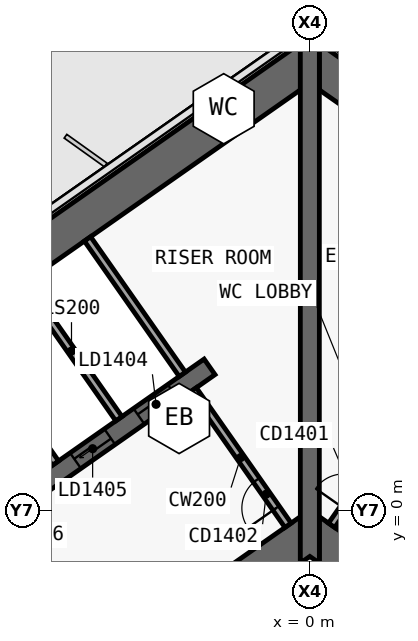
"""IFC4 building model, lengths in metres.
Left out: names, types, materials, properties, quantities, classifications, styles, units other than length and angle.
Written with IfcOpenShell. Run it as: python <this file> out.ifc"""

import sys

from ifc_helpers import new_model, si_unit, direction, frame, frame_2d, origin, place, context, subcontext, project, spatial, polyline, rectangle, outline, extrude, element, fill, save


model = new_model("IFC4")
c1 = context("Model", 3, precision=1e-05, world=origin(), true_north=direction((0.0, 1.0)))
c2 = subcontext(c1, "Body", "Model", "MODEL_VIEW")
j1 = project(units=[si_unit("LENGTHUNIT", "METRE"), si_unit("PLANEANGLEUNIT", "RADIAN")], contexts=[c1])
p1 = place(None, origin())
s1 = spatial("IfcSite", under=j1, at=p1, CompositionType="ELEMENT")
p2 = place(p1, origin())
s2 = spatial("IfcBuilding", under=s1, at=p2, CompositionType="ELEMENT")
p3 = place(p2, frame((0.0, 0.0, 76.1)))
s3 = spatial("IfcBuildingStorey", under=s2, at=p3, CompositionType="ELEMENT", Elevation=76.1)
p4 = place(p3, frame((0.037, 11.867, 0.0), z_axis=(0.0, 0.0, 1.0), x_axis=(-0.819155306259, -0.573571777746, 0.0)))
e1 = element("IfcWall", 1, at=p4, inside=s3, PredefinedType="SHEAR", context=c2, shape_type="SweptSolid", body=[
    extrude(outline(polyline([(33.837, 0.5), (0.7, 0.5), (0.0, -0.5), (33.837, -0.5), (33.837, 0.5)])), origin(), (0.0, 0.0, 1.0), 3.6),
])
p5 = place(p3, frame((0.037, -0.585, 0.0), z_axis=(0.0, 0.0, 1.0), x_axis=(-0.819157152511, -0.573569140985, 0.0)))
e2 = element("IfcWall", 2, at=p5, inside=s3, PredefinedType="SHEAR", context=c2, shape_type="SweptSolid", body=[
    extrude(outline(polyline([(26.695, 0.5), (0.7, 0.5), (0.0, -0.5), (26.695, -0.5), (26.695, 0.5)])), origin(), (0.0, 0.0, 1.0), 3.6),
])
p6 = place(p5, frame((2.995, 0.0, 0.0)))
e3 = element("IfcOpeningElement", 3, at=p6, cuts=e2, PredefinedType="OPENING", context=c2, shape_type="SweptSolid", body=[
    extrude(rectangle(XDim=2.4, YDim=2.1, at=frame_2d((1.2, 1.05))), frame((0.0, 0.51, 0.0), z_axis=(0.0, -1.0, 0.0), x_axis=(1.0, 0.0, 0.0)), (0.0, 0.0, 1.0), 1.02),
])
p7 = place(p5, frame((11.995, 0.0, 0.0)))
e4 = element("IfcOpeningElement", 4, at=p7, cuts=e2, PredefinedType="OPENING", context=c2, shape_type="SweptSolid", body=[
    extrude(rectangle(XDim=2.4, YDim=2.1, at=frame_2d((1.2, 1.05))), frame((0.0, 0.51, 0.0), z_axis=(0.0, -1.0, 0.0), x_axis=(1.0, 0.0, 0.0)), (0.0, 0.0, 1.0), 1.02),
])
p8 = place(p3, frame((-2.638, 3.768, 0.0), z_axis=(0.0, 0.0, 1.0), x_axis=(-0.819148977158, -0.573580816643, 0.0)))
e5 = element("IfcWall", 5, at=p8, inside=s3, PredefinedType="SHEAR", context=c2, shape_type="SweptSolid", body=[
    extrude(outline(polyline([(26.0, 0.25), (0.0, 0.25), (0.0, -0.25), (26.0, -0.25), (26.0, 0.25)])), origin(), (0.0, 0.0, 1.0), 3.6),
])
p9 = place(p8, frame((1.169, 0.0, 0.0)))
e6 = element("IfcOpeningElement", 6, at=p9, cuts=e5, PredefinedType="OPENING", context=c2, shape_type="SweptSolid", body=[
    extrude(rectangle(XDim=1.1, YDim=2.1, at=frame_2d((0.55, 1.05))), frame((0.0, 0.26, 0.0), z_axis=(0.0, -1.0, 0.0), x_axis=(1.0, 0.0, 0.0)), (0.0, 0.0, 1.0), 0.52),
])
p10 = place(p8, frame((3.206, 0.0, 0.0)))
e7 = element("IfcOpeningElement", 7, at=p10, cuts=e5, PredefinedType="OPENING", context=c2, shape_type="SweptSolid", body=[
    extrude(rectangle(XDim=1.1, YDim=2.1, at=frame_2d((0.55, 1.05))), frame((0.0, 0.26, 0.0), z_axis=(0.0, -1.0, 0.0), x_axis=(1.0, 0.0, 0.0)), (0.0, 0.0, 1.0), 0.52),
])
p11 = place(p8, frame((5.244, 0.0, 0.0)))
e8 = element("IfcOpeningElement", 8, at=p11, cuts=e5, PredefinedType="OPENING", context=c2, shape_type="SweptSolid", body=[
    extrude(rectangle(XDim=1.1, YDim=2.1, at=frame_2d((0.55, 1.05))), frame((0.0, 0.26, 0.0), z_axis=(0.0, -1.0, 0.0), x_axis=(1.0, 0.0, 0.0)), (0.0, 0.0, 1.0), 0.52),
])
p12 = place(p8, frame((7.281, 0.0, 0.0)))
e9 = element("IfcOpeningElement", 9, at=p12, cuts=e5, PredefinedType="OPENING", context=c2, shape_type="SweptSolid", body=[
    extrude(rectangle(XDim=1.1, YDim=2.1, at=frame_2d((0.55, 1.05))), frame((0.0, 0.26, 0.0), z_axis=(0.0, -1.0, 0.0), x_axis=(1.0, 0.0, 0.0)), (0.0, 0.0, 1.0), 0.52),
])
p13 = place(p8, frame((9.688, 0.0, 0.0)))
e10 = element("IfcOpeningElement", 10, at=p13, cuts=e5, PredefinedType="OPENING", context=c2, shape_type="SweptSolid", body=[
    extrude(rectangle(XDim=1.1, YDim=2.1, at=frame_2d((0.55, 1.05))), frame((0.0, 0.26, 0.0), z_axis=(0.0, -1.0, 0.0), x_axis=(1.0, 0.0, 0.0)), (0.0, 0.0, 1.0), 0.52),
])
p14 = place(p8, frame((11.863, 0.0, 0.0)))
e11 = element("IfcOpeningElement", 11, at=p14, cuts=e5, PredefinedType="OPENING", context=c2, shape_type="SweptSolid", body=[
    extrude(rectangle(XDim=1.1, YDim=2.1, at=frame_2d((0.55, 1.05))), frame((0.0, 0.26, 0.0), z_axis=(0.0, -1.0, 0.0), x_axis=(1.0, 0.0, 0.0)), (0.0, 0.0, 1.0), 0.52),
])
p15 = place(p8, frame((14.038, 0.0, 0.0)))
e12 = element("IfcOpeningElement", 12, at=p15, cuts=e5, PredefinedType="OPENING", context=c2, shape_type="SweptSolid", body=[
    extrude(rectangle(XDim=1.1, YDim=2.1, at=frame_2d((0.55, 1.05))), frame((0.0, 0.26, 0.0), z_axis=(0.0, -1.0, 0.0), x_axis=(1.0, 0.0, 0.0)), (0.0, 0.0, 1.0), 0.52),
])
p16 = place(p8, frame((16.212, 0.0, 0.0)))
e13 = element("IfcOpeningElement", 13, at=p16, cuts=e5, PredefinedType="OPENING", context=c2, shape_type="SweptSolid", body=[
    extrude(rectangle(XDim=1.1, YDim=2.1, at=frame_2d((0.55, 1.05))), frame((0.0, 0.26, 0.0), z_axis=(0.0, -1.0, 0.0), x_axis=(1.0, 0.0, 0.0)), (0.0, 0.0, 1.0), 0.52),
])
p17 = place(p3, frame((-0.037, 11.867, 0.0), z_axis=(0.0, 0.0, 1.0), x_axis=(0.819155306259, -0.573571777746, 0.0)))
e14 = element("IfcWall", 14, at=p17, inside=s3, PredefinedType="SHEAR", context=c2, shape_type="SweptSolid", body=[
    extrude(outline(polyline([(33.837, 0.5), (0.0, 0.5), (0.7, -0.5), (33.837, -0.5), (33.837, 0.5)])), origin(), (0.0, 0.0, 1.0), 3.6),
])
p18 = place(p3, frame((-0.037, -0.585, 0.0), z_axis=(0.0, 0.0, 1.0), x_axis=(0.819157152511, -0.573569140985, 0.0)))
e15 = element("IfcWall", 15, at=p18, inside=s3, PredefinedType="SHEAR", context=c2, shape_type="SweptSolid", body=[
    extrude(outline(polyline([(26.695, 0.5), (0.0, 0.5), (0.7, -0.5), (26.695, -0.5), (26.695, 0.5)])), origin(), (0.0, 0.0, 1.0), 3.6),
])
p19 = place(p18, frame((6.695, 0.0, 0.0)))
e16 = element("IfcOpeningElement", 16, at=p19, cuts=e15, PredefinedType="OPENING", context=c2, shape_type="SweptSolid", body=[
    extrude(rectangle(XDim=1.5, YDim=2.1, at=frame_2d((0.75, 1.05))), frame((0.0, 0.51, 0.0), z_axis=(0.0, -1.0, 0.0), x_axis=(1.0, 0.0, 0.0)), (0.0, 0.0, 1.0), 1.02),
])
p20 = place(p18, frame((12.445, 0.0, 0.0)))
e17 = element("IfcOpeningElement", 17, at=p20, cuts=e15, PredefinedType="OPENING", context=c2, shape_type="SweptSolid", body=[
    extrude(rectangle(XDim=1.5, YDim=2.1, at=frame_2d((0.75, 1.05))), frame((0.0, 0.51, 0.0), z_axis=(0.0, -1.0, 0.0), x_axis=(1.0, 0.0, 0.0)), (0.0, 0.0, 1.0), 1.02),
])
p21 = place(p3, frame((0.0, -1.396, 0.0), z_axis=(0.0, 0.0, 1.0), x_axis=(0.0, 1.0, 0.0)))
e18 = element("IfcWall", 18, at=p21, inside=s3, PredefinedType="SHEAR", context=c2, shape_type="SweptSolid", body=[
    extrude(outline(polyline([(0.0, -0.25), (0.175, -0.25), (1.221, -0.25), (12.452, -0.25), (13.848, -0.25), (13.857, -0.25), (13.968, -0.172), (13.848, 0.0), (13.968, 0.172), (13.857, 0.25), (13.848, 0.25), (12.452, 0.25), (1.221, 0.25), (0.175, 0.25), (0.0, 0.25), (0.175, 0.0), (0.0, -0.25)])), origin(), (0.0, 0.0, 1.0), 3.6),
])
p22 = place(p3, frame((-5.024, 2.403, 0.0), z_axis=(0.0, 0.0, 1.0), x_axis=(-0.573530143085, 0.819184457233, 0.0)))
e19 = element("IfcWall", 19, at=p22, inside=s3, PredefinedType="SOLIDWALL", context=c2, shape_type="SweptSolid", body=[
    extrude(rectangle(XDim=4.35, YDim=0.2, at=frame_2d((2.175, 0.0))), origin(), (0.0, 0.0, 1.0), 3.6),
])
p23 = place(p3, frame((-6.693, 1.234, 0.0), z_axis=(0.0, 0.0, 1.0), x_axis=(-0.573594173421, 0.819139624372, 0.0)))
e20 = element("IfcWall", 20, at=p23, inside=s3, PredefinedType="SOLIDWALL", context=c2, shape_type="SweptSolid", body=[
    extrude(rectangle(XDim=4.35, YDim=0.2, at=frame_2d((2.175, 0.0))), origin(), (0.0, 0.0, 1.0), 3.6),
])
p24 = place(p3, frame((-0.573, -0.402, 0.0), z_axis=(0.0, 0.0, 1.0), x_axis=(-0.57356780395, 0.819158088694, 0.0)))
e21 = element("IfcWall", 21, at=p24, inside=s3, PredefinedType="SOLIDWALL", context=c2, shape_type="SweptSolid", body=[
    extrude(rectangle(XDim=4.35, YDim=0.2, at=frame_2d((2.175, 0.0))), origin(), (0.0, 0.0, 1.0), 3.32),
])
p25 = place(p24, frame((0.55, 0.0, 0.0)))
e22 = element("IfcOpeningElement", 22, at=p25, cuts=e21, PredefinedType="OPENING", context=c2, shape_type="SweptSolid", body=[
    extrude(rectangle(XDim=0.9, YDim=2.1, at=frame_2d((0.45, 1.05))), frame((0.0, 0.11, 0.0), z_axis=(0.0, -1.0, 0.0), x_axis=(1.0, 0.0, 0.0)), (0.0, 0.0, 1.0), 0.22),
])
p26 = place(p3, frame((-3.355, 3.571, 0.0), z_axis=(0.0, 0.0, 1.0), x_axis=(-0.57356780395, 0.819158088694, 0.0)))
e23 = element("IfcWall", 23, at=p26, inside=s3, PredefinedType="SOLIDWALL", context=c2, shape_type="SweptSolid", body=[
    extrude(rectangle(XDim=4.35, YDim=0.2, at=frame_2d((2.175, 0.0))), origin(), (0.0, 0.0, 1.0), 3.32),
])
p27 = place(p3, frame((0.573, -0.402, 0.0), z_axis=(0.0, 0.0, 1.0), x_axis=(0.57356780395, 0.819158088694, 0.0)))
e24 = element("IfcWall", 24, at=p27, inside=s3, PredefinedType="SOLIDWALL", context=c2, shape_type="SweptSolid", body=[
    extrude(rectangle(XDim=4.35, YDim=0.2, at=frame_2d((2.175, 0.0))), origin(), (0.0, 0.0, 1.0), 3.32),
])
p28 = place(p27, frame((0.55, 0.0, 0.0)))
e25 = element("IfcOpeningElement", 25, at=p28, cuts=e24, PredefinedType="OPENING", context=c2, shape_type="SweptSolid", body=[
    extrude(rectangle(XDim=0.9, YDim=2.1, at=frame_2d((0.45, 1.05))), frame((0.0, 0.11, 0.0), z_axis=(0.0, -1.0, 0.0), x_axis=(1.0, 0.0, 0.0)), (0.0, 0.0, 1.0), 0.22),
])
p29 = place(p9, origin())
e26 = element("IfcDoor", 26, at=p29, inside=s3, OperationType="SLIDING_TO_LEFT", PredefinedType="DOOR", context=c2, shape_type="SweptSolid", body=[
    extrude(rectangle(XDim=1.1, YDim=2.1, at=frame_2d((0.55, 1.05))), frame((0.0, 0.025, 0.0), z_axis=(0.0, -1.0, 0.0), x_axis=(1.0, 0.0, 0.0)), (0.0, 0.0, 1.0), 0.05),
])
fill(e6, e26)
p30 = place(p10, origin())
e27 = element("IfcDoor", 27, at=p30, inside=s3, OperationType="SLIDING_TO_RIGHT", PredefinedType="DOOR", context=c2, shape_type="SweptSolid", body=[
    extrude(rectangle(XDim=1.1, YDim=2.1, at=frame_2d((0.55, 1.05))), frame((0.0, 0.025, 0.0), z_axis=(0.0, -1.0, 0.0), x_axis=(1.0, 0.0, 0.0)), (0.0, 0.0, 1.0), 0.05),
])
fill(e7, e27)
p31 = place(p25, origin())
e28 = element("IfcDoor", 28, at=p31, inside=s3, OperationType="SINGLE_SWING_RIGHT", PredefinedType="DOOR", context=c2, shape_type="SweptSolid", body=[
    extrude(rectangle(XDim=0.9, YDim=2.1, at=frame_2d((0.45, 1.05))), frame((0.0, 0.025, 0.0), z_axis=(0.0, -1.0, 0.0), x_axis=(1.0, 0.0, 0.0)), (0.0, 0.0, 1.0), 0.05),
])
fill(e22, e28)
save(model, sys.argv[1])
